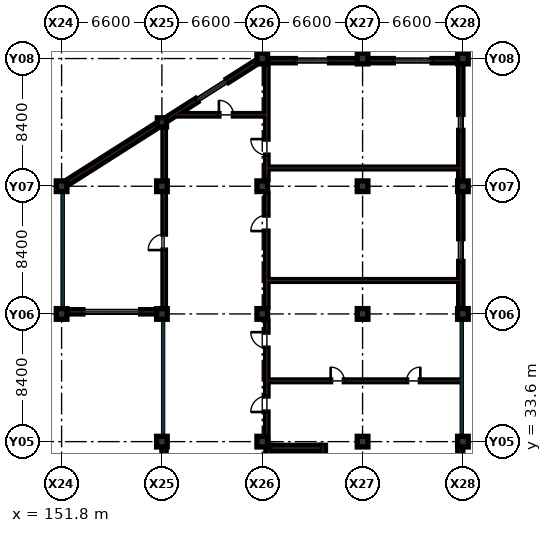
"""IFC4 building model, lengths in metres.
Left out: names, types, materials, properties, quantities, classifications, styles, units other than length and angle.
Written with IfcOpenShell. Run it as: python <this file> out.ifc"""

import sys

from ifc_helpers import new_model, si_unit, direction, frame, frame_2d, origin, origin_2d, place, context, subcontext, project, spatial, rectangle, extrude, element, fill, save


model = new_model("IFC4")
c1 = context("Model", 3, precision=1e-05, world=origin(), true_north=direction((0.0, 1.0)))
c2 = subcontext(c1, "Body", "Model", "MODEL_VIEW")
j1 = project(units=[si_unit("LENGTHUNIT", "METRE"), si_unit("PLANEANGLEUNIT", "RADIAN")], contexts=[c1])
p1 = place(None, origin())
s1 = spatial("IfcSite", under=j1, at=p1, CompositionType="ELEMENT")
p2 = place(p1, origin())
s2 = spatial("IfcBuilding", under=s1, at=p2, CompositionType="ELEMENT")
p3 = place(p2, frame((0.0, 0.0, 27.0)))
s3 = spatial("IfcBuildingStorey", under=s2, at=p3, CompositionType="ELEMENT", Elevation=27.0)
for number, where, z_axis, x_axis in (
    (1, (151.8, 42.0, 0.0), (0.0, 0.0, 1.0), (1.0, 0.0, 0.0)),
    (2, (151.8, 50.4, 0.0), (0.0, 0.0, 1.0), (1.0, 0.0, 0.0)),
    (3, (158.4, 33.6, 0.0), (0.0, 0.0, 1.0), (1.0, 0.0, 0.0)),
    (4, (158.4, 42.0, 0.0), (0.0, 0.0, 1.0), (1.0, 0.0, 0.0)),
    (5, (158.4, 50.4, 0.0), (0.0, 0.0, 1.0), (1.0, 0.0, 0.0)),
    (6, (165.0, 33.6, 0.0), (0.0, 0.0, 1.0), (1.0, 0.0, 0.0)),
    (7, (165.0, 42.0, 0.0), (0.0, 0.0, 1.0), (1.0, 0.0, 0.0)),
    (8, (165.0, 50.4, 0.0), (0.0, 0.0, 1.0), (1.0, 0.0, 0.0)),
    (9, (165.0, 58.8, 0.0), (0.0, 0.0, 1.0), (1.0, 0.0, 0.0)),
    (10, (171.6, 33.6, 0.0), (0.0, 0.0, 1.0), (1.0, 0.0, 0.0)),
    (11, (171.6, 42.0, 0.0), (0.0, 0.0, 1.0), (1.0, 0.0, 0.0)),
    (12, (171.6, 50.4, 0.0), (0.0, 0.0, 1.0), (1.0, 0.0, 0.0)),
    (13, (171.6, 58.8, 0.0), (0.0, 0.0, 1.0), (1.0, 0.0, 0.0)),
    (14, (178.2, 33.6, 0.0), (0.0, 0.0, 1.0), (1.0, 0.0, 0.0)),
    (15, (178.2, 42.0, 0.0), (0.0, 0.0, 1.0), (1.0, 0.0, 0.0)),
    (16, (178.2, 50.4, 0.0), (0.0, 0.0, 1.0), (1.0, 0.0, 0.0)),
    (17, (178.2, 58.8, 0.0), (0.0, 0.0, 1.0), (1.0, 0.0, 0.0)),
):
    element("IfcColumn", number, at=place(p3, frame(where, z_axis=z_axis, x_axis=x_axis)), inside=s3, PredefinedType="COLUMN", context=c2, shape_type="SweptSolid", body=[
        extrude(rectangle(XDim=0.7, YDim=0.7, at=origin_2d()), origin(), (0.0, 0.0, 1.0), 4.2),
    ])
p4 = place(p3, frame((158.4, 54.6, 0.0), z_axis=(0.0, 0.0, 1.0), x_axis=(1.0, 0.0, 0.0)))
e18 = element("IfcColumn", 18, at=p4, inside=s3, PredefinedType="COLUMN", context=c2, shape_type="SweptSolid", body=[
    extrude(rectangle(XDim=0.6, YDim=0.6, at=origin_2d()), origin(), (0.0, 0.0, 1.0), 3.98),
])
p5 = place(p3, frame((165.3, 33.65, 0.0), z_axis=(0.0, 0.0, 1.0), x_axis=(0.0, 1.0, 0.0)))
e19 = element("IfcWall", 19, at=p5, inside=s3, PredefinedType="PARTITIONING", context=c2, shape_type="SweptSolid", body=[
    extrude(rectangle(XDim=7.9, YDim=0.16, at=frame_2d((3.95, 0.0))), origin(), (0.0, 0.0, 1.0), 3.23),
])
p6 = place(p5, frame((1.9, 0.0, 0.0)))
e20 = element("IfcOpeningElement", 20, at=p6, cuts=e19, PredefinedType="OPENING", context=c2, shape_type="SweptSolid", body=[
    extrude(rectangle(XDim=1.05, YDim=2.15, at=frame_2d((0.525, 1.075))), frame((0.0, 0.09, 0.0), z_axis=(0.0, -1.0, 0.0), x_axis=(1.0, 0.0, 0.0)), (0.0, 0.0, 1.0), 0.18),
])
p7 = place(p5, frame((6.1, 0.0, 0.0)))
e21 = element("IfcOpeningElement", 21, at=p7, cuts=e19, PredefinedType="OPENING", context=c2, shape_type="SweptSolid", body=[
    extrude(rectangle(XDim=1.05, YDim=2.15, at=frame_2d((0.525, 1.075))), frame((0.0, 0.09, 0.0), z_axis=(0.0, -1.0, 0.0), x_axis=(1.0, 0.0, 0.0)), (0.0, 0.0, 1.0), 0.18),
])
p8 = place(p3, frame((165.3, 42.45, 0.0), z_axis=(0.0, 0.0, 1.0), x_axis=(0.0, 1.0, 0.0)))
e22 = element("IfcWall", 22, at=p8, inside=s3, PredefinedType="PARTITIONING", context=c2, shape_type="SweptSolid", body=[
    extrude(rectangle(XDim=7.5, YDim=0.16, at=frame_2d((3.75, 0.0))), origin(), (0.0, 0.0, 1.0), 3.23),
])
p9 = place(p8, frame((5.0, 0.0, 0.0)))
e23 = element("IfcOpeningElement", 23, at=p9, cuts=e22, PredefinedType="OPENING", context=c2, shape_type="SweptSolid", body=[
    extrude(rectangle(XDim=1.05, YDim=2.15, at=frame_2d((0.525, 1.075))), frame((0.0, 0.09, 0.0), z_axis=(0.0, -1.0, 0.0), x_axis=(1.0, 0.0, 0.0)), (0.0, 0.0, 1.0), 0.18),
])
p10 = place(p3, frame((165.3, 50.85, 0.0), z_axis=(0.0, 0.0, 1.0), x_axis=(0.0, 1.0, 0.0)))
e24 = element("IfcWall", 24, at=p10, inside=s3, PredefinedType="PARTITIONING", context=c2, shape_type="SweptSolid", body=[
    extrude(rectangle(XDim=7.65, YDim=0.16, at=frame_2d((3.825, 0.0))), origin(), (0.0, 0.0, 1.0), 3.23),
])
p11 = place(p10, frame((1.6, 0.0, 0.0)))
e25 = element("IfcOpeningElement", 25, at=p11, cuts=e24, PredefinedType="OPENING", context=c2, shape_type="SweptSolid", body=[
    extrude(rectangle(XDim=1.05, YDim=2.15, at=frame_2d((0.525, 1.075))), frame((0.0, 0.09, 0.0), z_axis=(0.0, -1.0, 0.0), x_axis=(1.0, 0.0, 0.0)), (0.0, 0.0, 1.0), 0.18),
])
for number, where, z_axis, x_axis in (
    (26, (165.3, 44.2, 0.0), (0.0, 0.0, 1.0), (1.0, 0.0, 0.0)),
    (27, (165.3, 51.6, 0.0), (0.0, 0.0, 1.0), (1.0, 0.0, 0.0)),
):
    element("IfcWall", number, at=place(p3, frame(where, z_axis=z_axis, x_axis=x_axis)), inside=s3, PredefinedType="PARTITIONING", context=c2, shape_type="SweptSolid", body=[
        extrude(rectangle(XDim=12.7, YDim=0.12, at=frame_2d((6.35, 0.0))), origin(), (0.0, 0.0, 1.0), 3.23),
    ])
p12 = place(p3, frame((165.3, 37.6, 0.0), z_axis=(0.0, 0.0, 1.0), x_axis=(1.0, 0.0, 0.0)))
e28 = element("IfcWall", 28, at=p12, inside=s3, PredefinedType="PARTITIONING", context=c2, shape_type="SweptSolid", body=[
    extrude(rectangle(XDim=12.75, YDim=0.12, at=frame_2d((6.375, 0.0))), origin(), (0.0, 0.0, 1.0), 3.23),
])
p13 = place(p12, frame((4.2, 0.0, 0.0)))
e29 = element("IfcOpeningElement", 29, at=p13, cuts=e28, PredefinedType="OPENING", context=c2, shape_type="SweptSolid", body=[
    extrude(rectangle(XDim=0.9, YDim=2.1, at=frame_2d((0.45, 1.05))), frame((0.0, 0.07, 0.0), z_axis=(0.0, -1.0, 0.0), x_axis=(1.0, 0.0, 0.0)), (0.0, 0.0, 1.0), 0.14),
])
p14 = place(p12, frame((9.2, 0.0, 0.0)))
e30 = element("IfcOpeningElement", 30, at=p14, cuts=e28, PredefinedType="OPENING", context=c2, shape_type="SweptSolid", body=[
    extrude(rectangle(XDim=0.9, YDim=2.1, at=frame_2d((0.45, 1.05))), frame((0.0, 0.07, 0.0), z_axis=(0.0, -1.0, 0.0), x_axis=(1.0, 0.0, 0.0)), (0.0, 0.0, 1.0), 0.14),
])
p15 = place(p3, frame((158.55, 42.0, 0.0), z_axis=(0.0, 0.0, 1.0), x_axis=(0.0, 1.0, 0.0)))
e31 = element("IfcWall", 31, at=p15, inside=s3, PredefinedType="PARTITIONING", context=c2, shape_type="SweptSolid", body=[
    extrude(rectangle(XDim=7.95, YDim=0.16, at=frame_2d((3.975, 0.0))), origin(), (0.0, 0.0, 1.0), 3.23),
])
p16 = place(p15, frame((4.2, 0.0, 0.0)))
e32 = element("IfcOpeningElement", 32, at=p16, cuts=e31, PredefinedType="OPENING", context=c2, shape_type="SweptSolid", body=[
    extrude(rectangle(XDim=1.05, YDim=2.15, at=frame_2d((0.525, 1.075))), frame((0.0, 0.09, 0.0), z_axis=(0.0, -1.0, 0.0), x_axis=(1.0, 0.0, 0.0)), (0.0, 0.0, 1.0), 0.18),
])
p17 = place(p3, frame((158.55, 50.85, 0.0), z_axis=(0.0, 0.0, 1.0), x_axis=(0.0, 1.0, 0.0)))
e33 = element("IfcWall", 33, at=p17, inside=s3, PredefinedType="PARTITIONING", context=c2, shape_type="SweptSolid", body=[
    extrude(rectangle(XDim=3.8, YDim=0.16, at=frame_2d((1.9, 0.0))), origin(), (0.0, 0.0, 1.0), 3.23),
])
p18 = place(p3, frame((159.35, 55.1, 0.0), z_axis=(0.0, 0.0, 1.0), x_axis=(1.0, 0.0, 0.0)))
e34 = element("IfcWall", 34, at=p18, inside=s3, PredefinedType="PARTITIONING", context=c2, shape_type="SweptSolid", body=[
    extrude(rectangle(XDim=5.95, YDim=0.16, at=frame_2d((2.975, 0.0))), origin(), (0.0, 0.0, 1.0), 3.23),
])
p19 = place(p18, frame((2.8, 0.0, 0.0)))
e35 = element("IfcOpeningElement", 35, at=p19, cuts=e34, PredefinedType="OPENING", context=c2, shape_type="SweptSolid", body=[
    extrude(rectangle(XDim=0.95, YDim=2.15, at=frame_2d((0.475, 1.075))), frame((0.0, 0.09, 0.0), z_axis=(0.0, -1.0, 0.0), x_axis=(1.0, 0.0, 0.0)), (0.0, 0.0, 1.0), 0.18),
])
p20 = place(p3, frame((152.145, 42.14, 0.0), z_axis=(0.0, 0.0, 1.0), x_axis=(1.0, 0.0, 0.0)))
e36 = element("IfcWall", 36, at=p20, inside=s3, PredefinedType="SOLIDWALL", context=c2, shape_type="SweptSolid", body=[
    extrude(rectangle(XDim=5.91, YDim=0.28, at=frame_2d((2.955, 0.0))), origin(), (0.0, 0.0, 1.0), 3.315),
])
p21 = place(p20, frame((1.055, 0.0, 1.35)))
e37 = element("IfcOpeningElement", 37, at=p21, cuts=e36, PredefinedType="OPENING", context=c2, shape_type="SweptSolid", body=[
    extrude(rectangle(XDim=3.8, YDim=1.15, at=frame_2d((1.9, 0.575))), frame((0.0, 0.15, 0.0), z_axis=(0.0, -1.0, 0.0), x_axis=(1.0, 0.0, 0.0)), (0.0, 0.0, 1.0), 0.3),
])
p22 = place(p3, frame((158.54, 33.255, 0.0), z_axis=(0.0, 0.0, 1.0), x_axis=(0.0, -1.0, 0.0)))
e38 = element("IfcWall", 38, at=p22, inside=s3, PredefinedType="SOLIDWALL", context=c2, shape_type="SweptSolid", body=[
    extrude(rectangle(XDim=7.71, YDim=0.28, at=frame_2d((3.855, 0.0))), origin(), (0.0, 0.0, 1.0), 3.365),
])
p23 = place(p22, frame((3.13, 0.0, 0.95)))
e39 = element("IfcOpeningElement", 39, at=p23, cuts=e38, PredefinedType="OPENING", context=c2, shape_type="SweptSolid", body=[
    extrude(rectangle(XDim=1.45, YDim=1.6, at=frame_2d((0.725, 0.8))), frame((0.0, 0.15, 0.0), z_axis=(0.0, -1.0, 0.0), x_axis=(1.0, 0.0, 0.0)), (0.0, 0.0, 1.0), 0.3),
])
p24 = place(p3, frame((171.255, 58.66, 0.0), z_axis=(0.0, 0.0, 1.0), x_axis=(-1.0, 0.0, 0.0)))
e40 = element("IfcWall", 40, at=p24, inside=s3, PredefinedType="SOLIDWALL", context=c2, shape_type="SweptSolid", body=[
    extrude(rectangle(XDim=5.91, YDim=0.28, at=frame_2d((2.955, 0.0))), origin(), (0.0, 0.0, 1.0), 3.315),
])
p25 = place(p24, frame((1.83, 0.0, 0.95)))
e41 = element("IfcOpeningElement", 41, at=p25, cuts=e40, PredefinedType="OPENING", context=c2, shape_type="SweptSolid", body=[
    extrude(rectangle(XDim=2.25, YDim=1.55, at=frame_2d((1.125, 0.775))), frame((0.0, 0.15, 0.0), z_axis=(0.0, -1.0, 0.0), x_axis=(1.0, 0.0, 0.0)), (0.0, 0.0, 1.0), 0.3),
])
p26 = place(p3, frame((178.03, 25.545, 0.0), z_axis=(0.0, 0.0, 1.0), x_axis=(0.0, 1.0, 0.0)))
e42 = element("IfcWall", 42, at=p26, inside=s3, PredefinedType="SHEAR", context=c2, shape_type="SweptSolid", body=[
    extrude(rectangle(XDim=7.71, YDim=0.34, at=frame_2d((3.855, 0.0))), origin(), (0.0, 0.0, 1.0), 3.98),
])
p27 = place(p3, frame((178.06, 42.345, 0.0), z_axis=(0.0, 0.0, 1.0), x_axis=(0.0, 1.0, 0.0)))
e43 = element("IfcWall", 43, at=p27, inside=s3, PredefinedType="SOLIDWALL", context=c2, shape_type="SweptSolid", body=[
    extrude(rectangle(XDim=7.71, YDim=0.28, at=frame_2d((3.855, 0.0))), origin(), (0.0, 0.0, 1.0), 3.365),
])
p28 = place(p27, frame((3.105, 0.0, 0.95)))
e44 = element("IfcOpeningElement", 44, at=p28, cuts=e43, PredefinedType="OPENING", context=c2, shape_type="SweptSolid", body=[
    extrude(rectangle(XDim=1.5, YDim=2.1, at=frame_2d((0.75, 1.05))), frame((0.0, 0.15, 0.0), z_axis=(0.0, -1.0, 0.0), x_axis=(1.0, 0.0, 0.0)), (0.0, 0.0, 1.0), 0.3),
])
p29 = place(p3, frame((178.06, 50.745, 0.0), z_axis=(0.0, 0.0, 1.0), x_axis=(0.0, 1.0, 0.0)))
e45 = element("IfcWall", 45, at=p29, inside=s3, PredefinedType="SOLIDWALL", context=c2, shape_type="SweptSolid", body=[
    extrude(rectangle(XDim=7.71, YDim=0.28, at=frame_2d((3.855, 0.0))), origin(), (0.0, 0.0, 1.0), 3.365),
])
p30 = place(p29, frame((3.33, 0.0, 0.95)))
e46 = element("IfcOpeningElement", 46, at=p30, cuts=e45, PredefinedType="OPENING", context=c2, shape_type="SweptSolid", body=[
    extrude(rectangle(XDim=1.05, YDim=1.75, at=frame_2d((0.525, 0.875))), frame((0.0, 0.15, 0.0), z_axis=(0.0, -1.0, 0.0), x_axis=(1.0, 0.0, 0.0)), (0.0, 0.0, 1.0), 0.3),
])
p31 = place(p3, frame((177.855, 58.66, 0.0), z_axis=(0.0, 0.0, 1.0), x_axis=(-1.0, 0.0, 0.0)))
e47 = element("IfcWall", 47, at=p31, inside=s3, PredefinedType="SOLIDWALL", context=c2, shape_type="SweptSolid", body=[
    extrude(rectangle(XDim=5.91, YDim=0.28, at=frame_2d((2.955, 0.0))), origin(), (0.0, 0.0, 1.0), 3.315),
])
p32 = place(p31, frame((1.68, 0.0, 0.95)))
e48 = element("IfcOpeningElement", 48, at=p32, cuts=e47, PredefinedType="OPENING", context=c2, shape_type="SweptSolid", body=[
    extrude(rectangle(XDim=2.55, YDim=1.65, at=frame_2d((1.275, 0.825))), frame((0.0, 0.15, 0.0), z_axis=(0.0, -1.0, 0.0), x_axis=(1.0, 0.0, 0.0)), (0.0, 0.0, 1.0), 0.3),
])
p33 = place(p3, frame((152.05, 50.56, 0.0), z_axis=(0.0, 0.0, 1.0), x_axis=(0.843776886751, 0.536694107835, 0.0)))
e49 = element("IfcWall", 49, at=p33, inside=s3, PredefinedType="SHEAR", context=c2, shape_type="SweptSolid", body=[
    extrude(rectangle(XDim=7.229, YDim=0.34, at=frame_2d((3.615, 0.0))), origin(), (0.0, 0.0, 1.0), 3.98),
])
p34 = place(p3, frame((158.65, 54.76, 0.0), z_axis=(0.0, 0.0, 1.0), x_axis=(0.843786613851, 0.536678814829, 0.0)))
e50 = element("IfcWall", 50, at=p34, inside=s3, PredefinedType="SOLIDWALL", context=c2, shape_type="SweptSolid", body=[
    extrude(rectangle(XDim=7.229, YDim=0.28, at=frame_2d((3.615, 0.0))), origin(), (0.0, 0.0, 1.0), 3.365),
])
p35 = place(p34, frame((2.415, 0.0, 0.95)))
e51 = element("IfcOpeningElement", 51, at=p35, cuts=e50, PredefinedType="OPENING", context=c2, shape_type="SweptSolid", body=[
    extrude(rectangle(XDim=2.4, YDim=1.6, at=frame_2d((1.2, 0.8))), frame((0.0, 0.15, 0.0), z_axis=(0.0, -1.0, 0.0), x_axis=(1.0, 0.0, 0.0)), (0.0, 0.0, 1.0), 0.3),
])
p36 = place(p3, frame((165.42, 25.19, 0.0), z_axis=(0.0, 0.0, 1.0), x_axis=(0.0, 1.0, 0.0)))
e52 = element("IfcWall", 52, at=p36, inside=s3, PredefinedType="SHEAR", context=c2, shape_type="SweptSolid", body=[
    extrude(rectangle(XDim=8.17, YDim=0.36, at=frame_2d((4.085, 0.0))), origin(), (0.0, 0.0, 1.0), 3.98),
])
p37 = place(p3, frame((168.98, 25.19, 0.0), z_axis=(0.0, 0.0, 1.0), x_axis=(0.0, 1.0, 0.0)))
e53 = element("IfcWall", 53, at=p37, inside=s3, PredefinedType="SHEAR", context=c2, shape_type="SweptSolid", body=[
    extrude(rectangle(XDim=8.17, YDim=0.36, at=frame_2d((4.085, 0.0))), origin(), (0.0, 0.0, 1.0), 3.98),
])
p38 = place(p37, frame((0.45, 0.0, 0.0)))
e54 = element("IfcOpeningElement", 54, at=p38, cuts=e53, PredefinedType="OPENING", context=c2, shape_type="SweptSolid", body=[
    extrude(rectangle(XDim=1.25, YDim=2.15, at=frame_2d((0.625, 1.075))), frame((0.0, 0.19, 0.0), z_axis=(0.0, -1.0, 0.0), x_axis=(1.0, 0.0, 0.0)), (0.0, 0.0, 1.0), 0.38),
])
p39 = place(p3, frame((165.6, 33.18, 0.0), z_axis=(0.0, 0.0, 1.0), x_axis=(1.0, 0.0, 0.0)))
e55 = element("IfcWall", 55, at=p39, inside=s3, PredefinedType="SHEAR", context=c2, shape_type="SweptSolid", body=[
    extrude(rectangle(XDim=3.2, YDim=0.36, at=frame_2d((1.6, 0.0))), origin(), (0.0, 0.0, 1.0), 3.98),
])
p40 = place(p6, origin())
e56 = element("IfcDoor", 56, at=p40, inside=s3, OperationType="SINGLE_SWING_LEFT", PredefinedType="DOOR", context=c2, shape_type="SweptSolid", body=[
    extrude(rectangle(XDim=1.05, YDim=2.15, at=frame_2d((0.525, 1.075))), frame((0.0, 0.025, 0.0), z_axis=(0.0, -1.0, 0.0), x_axis=(1.0, 0.0, 0.0)), (0.0, 0.0, 1.0), 0.05),
])
fill(e20, e56)
p41 = place(p7, origin())
e57 = element("IfcDoor", 57, at=p41, inside=s3, OperationType="SINGLE_SWING_RIGHT", PredefinedType="DOOR", context=c2, shape_type="SweptSolid", body=[
    extrude(rectangle(XDim=1.05, YDim=2.15, at=frame_2d((0.525, 1.075))), frame((0.0, 0.025, 0.0), z_axis=(0.0, -1.0, 0.0), x_axis=(1.0, 0.0, 0.0)), (0.0, 0.0, 1.0), 0.05),
])
fill(e21, e57)
p42 = place(p9, origin())
e58 = element("IfcDoor", 58, at=p42, inside=s3, OperationType="SINGLE_SWING_LEFT", PredefinedType="DOOR", context=c2, shape_type="SweptSolid", body=[
    extrude(rectangle(XDim=1.05, YDim=2.15, at=frame_2d((0.525, 1.075))), frame((0.0, 0.025, 0.0), z_axis=(0.0, -1.0, 0.0), x_axis=(1.0, 0.0, 0.0)), (0.0, 0.0, 1.0), 0.05),
])
fill(e23, e58)
p43 = place(p11, origin())
e59 = element("IfcDoor", 59, at=p43, inside=s3, OperationType="SINGLE_SWING_RIGHT", PredefinedType="DOOR", context=c2, shape_type="SweptSolid", body=[
    extrude(rectangle(XDim=1.05, YDim=2.15, at=frame_2d((0.525, 1.075))), frame((0.0, 0.025, 0.0), z_axis=(0.0, -1.0, 0.0), x_axis=(1.0, 0.0, 0.0)), (0.0, 0.0, 1.0), 0.05),
])
fill(e25, e59)
p44 = place(p13, origin())
e60 = element("IfcDoor", 60, at=p44, inside=s3, OperationType="SINGLE_SWING_LEFT", PredefinedType="DOOR", context=c2, shape_type="SweptSolid", body=[
    extrude(rectangle(XDim=0.9, YDim=2.1, at=frame_2d((0.45, 1.05))), frame((0.0, 0.025, 0.0), z_axis=(0.0, -1.0, 0.0), x_axis=(1.0, 0.0, 0.0)), (0.0, 0.0, 1.0), 0.05),
])
fill(e29, e60)
p45 = place(p14, origin())
e61 = element("IfcDoor", 61, at=p45, inside=s3, OperationType="SINGLE_SWING_RIGHT", PredefinedType="DOOR", context=c2, shape_type="SweptSolid", body=[
    extrude(rectangle(XDim=0.9, YDim=2.1, at=frame_2d((0.45, 1.05))), frame((0.0, 0.025, 0.0), z_axis=(0.0, -1.0, 0.0), x_axis=(1.0, 0.0, 0.0)), (0.0, 0.0, 1.0), 0.05),
])
fill(e30, e61)
p46 = place(p16, origin())
e62 = element("IfcDoor", 62, at=p46, inside=s3, OperationType="SINGLE_SWING_LEFT", PredefinedType="DOOR", context=c2, shape_type="SweptSolid", body=[
    extrude(rectangle(XDim=1.05, YDim=2.15, at=frame_2d((0.525, 1.075))), frame((0.0, 0.025, 0.0), z_axis=(0.0, -1.0, 0.0), x_axis=(1.0, 0.0, 0.0)), (0.0, 0.0, 1.0), 0.05),
])
fill(e32, e62)
p47 = place(p19, origin())
e63 = element("IfcDoor", 63, at=p47, inside=s3, OperationType="SINGLE_SWING_LEFT", PredefinedType="DOOR", context=c2, shape_type="SweptSolid", body=[
    extrude(rectangle(XDim=0.95, YDim=2.15, at=frame_2d((0.475, 1.075))), frame((0.0, 0.025, 0.0), z_axis=(0.0, -1.0, 0.0), x_axis=(1.0, 0.0, 0.0)), (0.0, 0.0, 1.0), 0.05),
])
fill(e35, e63)
p48 = place(p21, origin())
e64 = element("IfcWindow", 64, at=p48, inside=s3, PartitioningType="SINGLE_PANEL", PredefinedType="WINDOW", context=c2, shape_type="SweptSolid", body=[
    extrude(rectangle(XDim=3.8, YDim=1.15, at=frame_2d((1.9, 0.575))), frame((0.0, 0.03, 0.0), z_axis=(0.0, -1.0, 0.0), x_axis=(1.0, 0.0, 0.0)), (0.0, 0.0, 1.0), 0.06),
])
fill(e37, e64)
p49 = place(p25, origin())
e65 = element("IfcWindow", 65, at=p49, inside=s3, PartitioningType="SINGLE_PANEL", PredefinedType="WINDOW", context=c2, shape_type="SweptSolid", body=[
    extrude(rectangle(XDim=2.25, YDim=1.55, at=frame_2d((1.125, 0.775))), frame((0.0, 0.03, 0.0), z_axis=(0.0, -1.0, 0.0), x_axis=(1.0, 0.0, 0.0)), (0.0, 0.0, 1.0), 0.06),
])
fill(e41, e65)
p50 = place(p28, origin())
e66 = element("IfcWindow", 66, at=p50, inside=s3, PartitioningType="SINGLE_PANEL", PredefinedType="WINDOW", context=c2, shape_type="SweptSolid", body=[
    extrude(rectangle(XDim=1.5, YDim=2.1, at=frame_2d((0.75, 1.05))), frame((0.0, 0.03, 0.0), z_axis=(0.0, -1.0, 0.0), x_axis=(1.0, 0.0, 0.0)), (0.0, 0.0, 1.0), 0.06),
])
fill(e44, e66)
p51 = place(p30, origin())
e67 = element("IfcWindow", 67, at=p51, inside=s3, PartitioningType="SINGLE_PANEL", PredefinedType="WINDOW", context=c2, shape_type="SweptSolid", body=[
    extrude(rectangle(XDim=1.05, YDim=1.75, at=frame_2d((0.525, 0.875))), frame((0.0, 0.03, 0.0), z_axis=(0.0, -1.0, 0.0), x_axis=(1.0, 0.0, 0.0)), (0.0, 0.0, 1.0), 0.06),
])
fill(e46, e67)
p52 = place(p32, origin())
e68 = element("IfcWindow", 68, at=p52, inside=s3, PartitioningType="SINGLE_PANEL", PredefinedType="WINDOW", context=c2, shape_type="SweptSolid", body=[
    extrude(rectangle(XDim=2.55, YDim=1.65, at=frame_2d((1.275, 0.825))), frame((0.0, 0.03, 0.0), z_axis=(0.0, -1.0, 0.0), x_axis=(1.0, 0.0, 0.0)), (0.0, 0.0, 1.0), 0.06),
])
fill(e48, e68)
p53 = place(p35, origin())
e69 = element("IfcWindow", 69, at=p53, inside=s3, PartitioningType="SINGLE_PANEL", PredefinedType="WINDOW", context=c2, shape_type="SweptSolid", body=[
    extrude(rectangle(XDim=2.4, YDim=1.6, at=frame_2d((1.2, 0.8))), frame((0.0, 0.03, 0.0), z_axis=(0.0, -1.0, 0.0), x_axis=(1.0, 0.0, 0.0)), (0.0, 0.0, 1.0), 0.06),
])
fill(e51, e69)
save(model, sys.argv[1])
